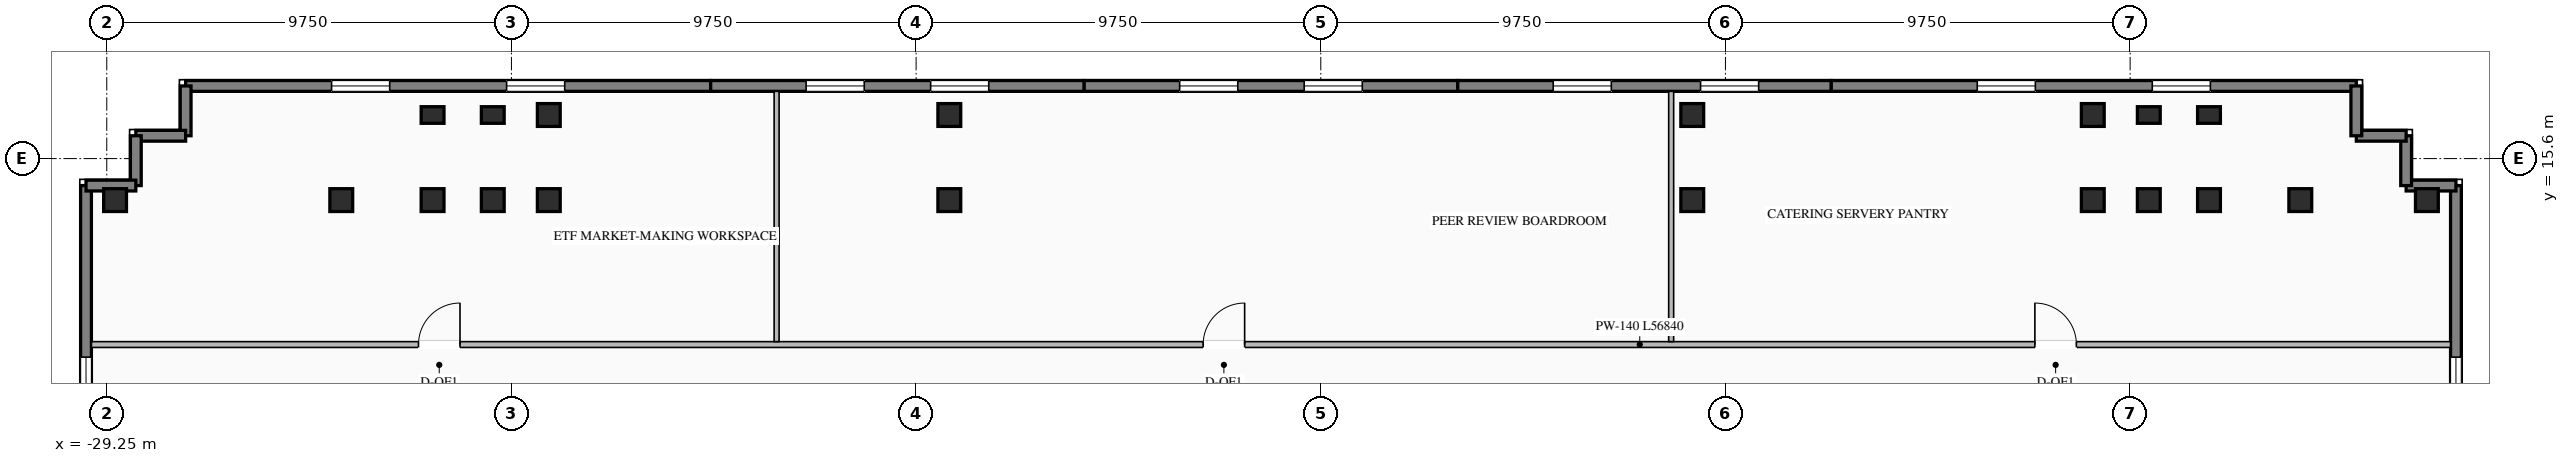
"""IFC4 building model, lengths in metres.
Left out: names, types, materials, properties, quantities, classifications, styles, units other than length and angle.
Written with IfcOpenShell. Run it as: python <this file> out.ifc"""

import sys

from ifc_helpers import new_model, si_unit, direction, frame, frame_2d, origin, origin_2d, place, context, subcontext, project, spatial, rectangle, i_section, extrude, element, fill, save


model = new_model("IFC4")
c1 = context("Model", 3, precision=1e-05, world=origin(), true_north=direction((0.0, 1.0)))
c2 = subcontext(c1, "Body", "Model", "MODEL_VIEW")
j1 = project(units=[si_unit("LENGTHUNIT", "METRE"), si_unit("PLANEANGLEUNIT", "RADIAN")], contexts=[c1])
p1 = place(None, origin())
s1 = spatial("IfcSite", under=j1, at=p1, CompositionType="ELEMENT")
p2 = place(p1, origin())
s2 = spatial("IfcBuilding", under=s1, at=p2, CompositionType="ELEMENT")
p3 = place(p2, frame((0.0, 0.0, 208.5)))
s3 = spatial("IfcBuildingStorey", under=s2, at=p3, CompositionType="ELEMENT", Elevation=208.5)
for number, where, z_axis, x_axis in (
    (1, (-21.4, 14.6, 0.0), (0.0, 0.0, 1.0), (1.0, 0.0, 0.0)),
    (2, (-19.95, 14.6, 0.0), (0.0, 0.0, 1.0), (1.0, 0.0, 0.0)),
    (3, (-18.6, 14.6, 0.0), (0.0, 0.0, 1.0), (1.0, 0.0, 0.0)),
    (4, (-8.95, 14.6, 0.0), (0.0, 0.0, 1.0), (1.0, 0.0, 0.0)),
    (5, (8.95, 14.6, 0.0), (0.0, 0.0, 1.0), (1.0, 0.0, 0.0)),
    (6, (18.6, 14.6, 0.0), (0.0, 0.0, 1.0), (1.0, 0.0, 0.0)),
    (7, (19.95, 14.6, 0.0), (0.0, 0.0, 1.0), (1.0, 0.0, 0.0)),
    (8, (21.4, 14.6, 0.0), (0.0, 0.0, 1.0), (1.0, 0.0, 0.0)),
    (9, (-23.6, 14.6, 0.0), (0.0, 0.0, 1.0), (1.0, 0.0, 0.0)),
    (10, (23.6, 14.6, 0.0), (0.0, 0.0, 1.0), (1.0, 0.0, 0.0)),
    (11, (-18.6, 16.65, 0.0), (0.0, 0.0, 1.0), (1.0, 0.0, 0.0)),
    (12, (-8.95, 16.65, 0.0), (0.0, 0.0, 1.0), (1.0, 0.0, 0.0)),
    (13, (8.95, 16.65, 0.0), (0.0, 0.0, 1.0), (1.0, 0.0, 0.0)),
    (14, (18.6, 16.65, 0.0), (0.0, 0.0, 1.0), (1.0, 0.0, 0.0)),
    (15, (-29.05, 14.6, 0.0), (0.0, 0.0, 1.0), (1.0, 0.0, 0.0)),
    (16, (26.65, 14.6, 0.0), (0.0, 0.0, 1.0), (1.0, 0.0, 0.0)),
):
    element("IfcColumn", number, at=place(p3, frame(where, z_axis=z_axis, x_axis=x_axis)), inside=s3, PredefinedType="COLUMN", context=c2, shape_type="SweptSolid", body=[
        extrude(i_section(OverallWidth=0.55, OverallDepth=0.55, WebThickness=0.024, FlangeThickness=0.036, at=origin_2d()), origin(), (0.0, 0.0, 1.0), 3.45),
    ])
for number, where, z_axis, x_axis in (
    (17, (-21.4, 16.65, 0.0), (0.0, 0.0, 1.0), (1.0, 0.0, 0.0)),
    (18, (-19.95, 16.65, 0.0), (0.0, 0.0, 1.0), (1.0, 0.0, 0.0)),
    (19, (19.95, 16.65, 0.0), (0.0, 0.0, 1.0), (1.0, 0.0, 0.0)),
    (20, (21.4, 16.65, 0.0), (0.0, 0.0, 1.0), (1.0, 0.0, 0.0)),
):
    element("IfcColumn", number, at=place(p3, frame(where, z_axis=z_axis, x_axis=x_axis)), inside=s3, PredefinedType="PILASTER", context=c2, shape_type="SweptSolid", body=[
        extrude(rectangle(XDim=0.55, YDim=0.4, at=origin_2d()), origin(), (0.0, 0.0, 1.0), 3.45),
    ])
p4 = place(p3, frame((-27.35, 17.35, 0.0), z_axis=(0.0, 0.0, 1.0), x_axis=(1.0, 0.0, 0.0)))
e21 = element("IfcWall", 21, at=p4, inside=s3, PredefinedType="STANDARD", context=c2, shape_type="SweptSolid", body=[
    extrude(rectangle(XDim=12.65, YDim=0.26, at=frame_2d((6.325, 0.0))), origin(), (0.0, 0.0, 1.0), 3.25),
])
p5 = place(p4, frame((3.517, 0.0, 0.76)))
e22 = element("IfcOpeningElement", 22, at=p5, cuts=e21, PredefinedType="OPENING", context=c2, shape_type="SweptSolid", body=[
    extrude(rectangle(XDim=1.4, YDim=1.95, at=frame_2d((0.7, 0.975))), frame((0.0, 0.14, 0.0), z_axis=(0.0, -1.0, 0.0), x_axis=(1.0, 0.0, 0.0)), (0.0, 0.0, 1.0), 0.28),
])
p6 = place(p4, frame((7.733, 0.0, 0.76)))
e23 = element("IfcOpeningElement", 23, at=p6, cuts=e21, PredefinedType="OPENING", context=c2, shape_type="SweptSolid", body=[
    extrude(rectangle(XDim=1.4, YDim=1.95, at=frame_2d((0.7, 0.975))), frame((0.0, 0.14, 0.0), z_axis=(0.0, -1.0, 0.0), x_axis=(1.0, 0.0, 0.0)), (0.0, 0.0, 1.0), 0.28),
])
p7 = place(p3, frame((-14.7, 17.35, 0.0), z_axis=(0.0, 0.0, 1.0), x_axis=(1.0, 0.0, 0.0)))
e24 = element("IfcWall", 24, at=p7, inside=s3, PredefinedType="STANDARD", context=c2, shape_type="SweptSolid", body=[
    extrude(rectangle(XDim=9.0, YDim=0.26, at=frame_2d((4.5, 0.0))), origin(), (0.0, 0.0, 1.0), 3.25),
])
p8 = place(p7, frame((2.3, 0.0, 0.76)))
e25 = element("IfcOpeningElement", 25, at=p8, cuts=e24, PredefinedType="OPENING", context=c2, shape_type="SweptSolid", body=[
    extrude(rectangle(XDim=1.4, YDim=1.95, at=frame_2d((0.7, 0.975))), frame((0.0, 0.14, 0.0), z_axis=(0.0, -1.0, 0.0), x_axis=(1.0, 0.0, 0.0)), (0.0, 0.0, 1.0), 0.28),
])
p9 = place(p7, frame((5.3, 0.0, 0.76)))
e26 = element("IfcOpeningElement", 26, at=p9, cuts=e24, PredefinedType="OPENING", context=c2, shape_type="SweptSolid", body=[
    extrude(rectangle(XDim=1.4, YDim=1.95, at=frame_2d((0.7, 0.975))), frame((0.0, 0.14, 0.0), z_axis=(0.0, -1.0, 0.0), x_axis=(1.0, 0.0, 0.0)), (0.0, 0.0, 1.0), 0.28),
])
p10 = place(p3, frame((-5.7, 17.35, 0.0), z_axis=(0.0, 0.0, 1.0), x_axis=(1.0, 0.0, 0.0)))
e27 = element("IfcWall", 27, at=p10, inside=s3, PredefinedType="STANDARD", context=c2, shape_type="SweptSolid", body=[
    extrude(rectangle(XDim=9.0, YDim=0.26, at=frame_2d((4.5, 0.0))), origin(), (0.0, 0.0, 1.0), 3.25),
])
p11 = place(p10, frame((2.3, 0.0, 0.76)))
e28 = element("IfcOpeningElement", 28, at=p11, cuts=e27, PredefinedType="OPENING", context=c2, shape_type="SweptSolid", body=[
    extrude(rectangle(XDim=1.4, YDim=1.95, at=frame_2d((0.7, 0.975))), frame((0.0, 0.14, 0.0), z_axis=(0.0, -1.0, 0.0), x_axis=(1.0, 0.0, 0.0)), (0.0, 0.0, 1.0), 0.28),
])
p12 = place(p10, frame((5.3, 0.0, 0.76)))
e29 = element("IfcOpeningElement", 29, at=p12, cuts=e27, PredefinedType="OPENING", context=c2, shape_type="SweptSolid", body=[
    extrude(rectangle(XDim=1.4, YDim=1.95, at=frame_2d((0.7, 0.975))), frame((0.0, 0.14, 0.0), z_axis=(0.0, -1.0, 0.0), x_axis=(1.0, 0.0, 0.0)), (0.0, 0.0, 1.0), 0.28),
])
p13 = place(p3, frame((3.3, 17.35, 0.0), z_axis=(0.0, 0.0, 1.0), x_axis=(1.0, 0.0, 0.0)))
e30 = element("IfcWall", 30, at=p13, inside=s3, PredefinedType="STANDARD", context=c2, shape_type="SweptSolid", body=[
    extrude(rectangle(XDim=9.0, YDim=0.26, at=frame_2d((4.5, 0.0))), origin(), (0.0, 0.0, 1.0), 3.25),
])
p14 = place(p13, frame((2.3, 0.0, 0.76)))
e31 = element("IfcOpeningElement", 31, at=p14, cuts=e30, PredefinedType="OPENING", context=c2, shape_type="SweptSolid", body=[
    extrude(rectangle(XDim=1.4, YDim=1.95, at=frame_2d((0.7, 0.975))), frame((0.0, 0.14, 0.0), z_axis=(0.0, -1.0, 0.0), x_axis=(1.0, 0.0, 0.0)), (0.0, 0.0, 1.0), 0.28),
])
p15 = place(p13, frame((5.85, 0.0, 0.76)))
e32 = element("IfcOpeningElement", 32, at=p15, cuts=e30, PredefinedType="OPENING", context=c2, shape_type="SweptSolid", body=[
    extrude(rectangle(XDim=1.4, YDim=1.95, at=frame_2d((0.7, 0.975))), frame((0.0, 0.14, 0.0), z_axis=(0.0, -1.0, 0.0), x_axis=(1.0, 0.0, 0.0)), (0.0, 0.0, 1.0), 0.28),
])
p16 = place(p3, frame((12.3, 17.35, 0.0), z_axis=(0.0, 0.0, 1.0), x_axis=(1.0, 0.0, 0.0)))
e33 = element("IfcWall", 33, at=p16, inside=s3, PredefinedType="STANDARD", context=c2, shape_type="SweptSolid", body=[
    extrude(rectangle(XDim=12.65, YDim=0.26, at=frame_2d((6.325, 0.0))), origin(), (0.0, 0.0, 1.0), 3.25),
])
p17 = place(p16, frame((3.517, 0.0, 0.76)))
e34 = element("IfcOpeningElement", 34, at=p17, cuts=e33, PredefinedType="OPENING", context=c2, shape_type="SweptSolid", body=[
    extrude(rectangle(XDim=1.4, YDim=1.95, at=frame_2d((0.7, 0.975))), frame((0.0, 0.14, 0.0), z_axis=(0.0, -1.0, 0.0), x_axis=(1.0, 0.0, 0.0)), (0.0, 0.0, 1.0), 0.28),
])
p18 = place(p16, frame((7.733, 0.0, 0.76)))
e35 = element("IfcOpeningElement", 35, at=p18, cuts=e33, PredefinedType="OPENING", context=c2, shape_type="SweptSolid", body=[
    extrude(rectangle(XDim=1.4, YDim=1.95, at=frame_2d((0.7, 0.975))), frame((0.0, 0.14, 0.0), z_axis=(0.0, -1.0, 0.0), x_axis=(1.0, 0.0, 0.0)), (0.0, 0.0, 1.0), 0.28),
])
p19 = place(p3, frame((-29.75, -0.9, 0.0), z_axis=(0.0, 0.0, 1.0), x_axis=(0.0, 1.0, 0.0)))
e36 = element("IfcWall", 36, at=p19, inside=s3, PredefinedType="STANDARD", context=c2, shape_type="SweptSolid", body=[
    extrude(rectangle(XDim=15.85, YDim=0.26, at=frame_2d((7.925, 0.0))), origin(), (0.0, 0.0, 1.0), 3.25),
])
p20 = place(p19, frame((4.683, 0.0, 0.76)))
e37 = element("IfcOpeningElement", 37, at=p20, cuts=e36, PredefinedType="OPENING", context=c2, shape_type="SweptSolid", body=[
    extrude(rectangle(XDim=1.2, YDim=1.95, at=frame_2d((0.6, 0.975))), frame((0.0, 0.14, 0.0), z_axis=(0.0, -1.0, 0.0), x_axis=(1.0, 0.0, 0.0)), (0.0, 0.0, 1.0), 0.28),
])
p21 = place(p19, frame((10.517, 0.0, 0.76)))
e38 = element("IfcOpeningElement", 38, at=p21, cuts=e36, PredefinedType="OPENING", context=c2, shape_type="SweptSolid", body=[
    extrude(rectangle(XDim=1.2, YDim=1.95, at=frame_2d((0.6, 0.975))), frame((0.0, 0.14, 0.0), z_axis=(0.0, -1.0, 0.0), x_axis=(1.0, 0.0, 0.0)), (0.0, 0.0, 1.0), 0.28),
])
p22 = place(p3, frame((27.35, 14.95, 0.0), z_axis=(0.0, 0.0, 1.0), x_axis=(0.0, -1.0, 0.0)))
e39 = element("IfcWall", 39, at=p22, inside=s3, PredefinedType="STANDARD", context=c2, shape_type="SweptSolid", body=[
    extrude(rectangle(XDim=15.85, YDim=0.26, at=frame_2d((7.925, 0.0))), origin(), (0.0, 0.0, 1.0), 3.25),
])
p23 = place(p22, frame((4.133, 0.0, 0.76)))
e40 = element("IfcOpeningElement", 40, at=p23, cuts=e39, PredefinedType="OPENING", context=c2, shape_type="SweptSolid", body=[
    extrude(rectangle(XDim=1.2, YDim=1.95, at=frame_2d((0.6, 0.975))), frame((0.0, 0.14, 0.0), z_axis=(0.0, -1.0, 0.0), x_axis=(1.0, 0.0, 0.0)), (0.0, 0.0, 1.0), 0.28),
])
p24 = place(p22, frame((9.967, 0.0, 0.76)))
e41 = element("IfcOpeningElement", 41, at=p24, cuts=e39, PredefinedType="OPENING", context=c2, shape_type="SweptSolid", body=[
    extrude(rectangle(XDim=1.2, YDim=1.95, at=frame_2d((0.6, 0.975))), frame((0.0, 0.14, 0.0), z_axis=(0.0, -1.0, 0.0), x_axis=(1.0, 0.0, 0.0)), (0.0, 0.0, 1.0), 0.28),
])
p25 = place(p3, frame((27.35, 14.95, 0.0), z_axis=(0.0, 0.0, 1.0), x_axis=(-1.0, 0.0, 0.0)))
e42 = element("IfcWall", 42, at=p25, inside=s3, PredefinedType="STANDARD", context=c2, shape_type="SweptSolid", body=[
    extrude(rectangle(XDim=1.2, YDim=0.26, at=frame_2d((0.6, 0.0))), origin(), (0.0, 0.0, 1.0), 2.565),
])
for number, where, z_axis, x_axis in (
    (43, (26.15, 14.95, 0.0), (0.0, 0.0, 1.0), (0.0, 1.0, 0.0)),
    (44, (26.15, 16.15, 0.0), (0.0, 0.0, 1.0), (-1.0, 0.0, 0.0)),
):
    element("IfcWall", number, at=place(p3, frame(where, z_axis=z_axis, x_axis=x_axis)), inside=s3, PredefinedType="STANDARD", context=c2, shape_type="SweptSolid", body=[
        extrude(rectangle(XDim=1.2, YDim=0.26, at=frame_2d((0.6, 0.0))), origin(), (0.0, 0.0, 1.0), 2.565),
    ])
for number, where, z_axis, x_axis in (
    (45, (24.95, 16.15, 0.0), (0.0, 0.0, 1.0), (0.0, 1.0, 0.0)),
    (46, (-27.35, 17.35, 0.0), (0.0, 0.0, 1.0), (0.0, -1.0, 0.0)),
):
    element("IfcWall", number, at=place(p3, frame(where, z_axis=z_axis, x_axis=x_axis)), inside=s3, PredefinedType="STANDARD", context=c2, shape_type="SweptSolid", body=[
        extrude(rectangle(XDim=1.2, YDim=0.26, at=frame_2d((0.6, 0.0))), origin(), (0.0, 0.0, 1.0), 2.565),
    ])
for number, where, z_axis, x_axis in (
    (47, (-27.35, 16.15, 0.0), (0.0, 0.0, 1.0), (-1.0, 0.0, 0.0)),
    (48, (-28.55, 16.15, 0.0), (0.0, 0.0, 1.0), (0.0, -1.0, 0.0)),
    (49, (-28.55, 14.95, 0.0), (0.0, 0.0, 1.0), (-1.0, 0.0, 0.0)),
):
    element("IfcWall", number, at=place(p3, frame(where, z_axis=z_axis, x_axis=x_axis)), inside=s3, PredefinedType="STANDARD", context=c2, shape_type="SweptSolid", body=[
        extrude(rectangle(XDim=1.2, YDim=0.26, at=frame_2d((0.6, 0.0))), origin(), (0.0, 0.0, 1.0), 2.565),
    ])
p26 = place(p3, frame((-29.62, 11.12, 0.0), z_axis=(0.0, 0.0, 1.0), x_axis=(1.0, 0.0, 0.0)))
e50 = element("IfcWall", 50, at=p26, inside=s3, PredefinedType="STANDARD", context=c2, shape_type="SweptSolid", body=[
    extrude(rectangle(XDim=56.84, YDim=0.14, at=frame_2d((28.42, 0.0))), origin(), (0.0, 0.0, 1.0), 3.25),
])
p27 = place(p26, frame((7.881, 0.0, 0.0)))
e51 = element("IfcOpeningElement", 51, at=p27, cuts=e50, PredefinedType="OPENING", context=c2, shape_type="SweptSolid", body=[
    extrude(rectangle(XDim=1.0, YDim=2.08, at=frame_2d((0.5, 1.04))), frame((0.0, 0.08, 0.0), z_axis=(0.0, -1.0, 0.0), x_axis=(1.0, 0.0, 0.0)), (0.0, 0.0, 1.0), 0.16),
])
p28 = place(p26, frame((26.785, 0.0, 0.0)))
e52 = element("IfcOpeningElement", 52, at=p28, cuts=e50, PredefinedType="OPENING", context=c2, shape_type="SweptSolid", body=[
    extrude(rectangle(XDim=1.0, YDim=2.08, at=frame_2d((0.5, 1.04))), frame((0.0, 0.08, 0.0), z_axis=(0.0, -1.0, 0.0), x_axis=(1.0, 0.0, 0.0)), (0.0, 0.0, 1.0), 0.16),
])
p29 = place(p26, frame((46.825, 0.0, 0.0)))
e53 = element("IfcOpeningElement", 53, at=p29, cuts=e50, PredefinedType="OPENING", context=c2, shape_type="SweptSolid", body=[
    extrude(rectangle(XDim=1.0, YDim=2.08, at=frame_2d((0.5, 1.04))), frame((0.0, 0.08, 0.0), z_axis=(0.0, -1.0, 0.0), x_axis=(1.0, 0.0, 0.0)), (0.0, 0.0, 1.0), 0.16),
])
for number, where, z_axis, x_axis in (
    (54, (-13.111, 11.19, 0.0), (0.0, 0.0, 1.0), (0.0, 1.0, 0.0)),
    (55, (8.442, 11.19, 0.0), (0.0, 0.0, 1.0), (0.0, 1.0, 0.0)),
):
    element("IfcWall", number, at=place(p3, frame(where, z_axis=z_axis, x_axis=x_axis)), inside=s3, PredefinedType="STANDARD", context=c2, shape_type="SweptSolid", body=[
        extrude(rectangle(XDim=6.03, YDim=0.12, at=frame_2d((3.015, 0.0))), origin(), (0.0, 0.0, 1.0), 3.25),
    ])
p30 = place(p5, origin())
e56 = element("IfcWindow", 56, at=p30, inside=s3, PartitioningType="SINGLE_PANEL", PredefinedType="WINDOW", context=c2, shape_type="SweptSolid", body=[
    extrude(rectangle(XDim=1.4, YDim=1.95, at=frame_2d((0.7, 0.975))), frame((0.0, 0.03, 0.0), z_axis=(0.0, -1.0, 0.0), x_axis=(1.0, 0.0, 0.0)), (0.0, 0.0, 1.0), 0.06),
])
fill(e22, e56)
p31 = place(p6, origin())
e57 = element("IfcWindow", 57, at=p31, inside=s3, PartitioningType="SINGLE_PANEL", PredefinedType="WINDOW", context=c2, shape_type="SweptSolid", body=[
    extrude(rectangle(XDim=1.4, YDim=1.95, at=frame_2d((0.7, 0.975))), frame((0.0, 0.03, 0.0), z_axis=(0.0, -1.0, 0.0), x_axis=(1.0, 0.0, 0.0)), (0.0, 0.0, 1.0), 0.06),
])
fill(e23, e57)
p32 = place(p8, origin())
e58 = element("IfcWindow", 58, at=p32, inside=s3, PartitioningType="SINGLE_PANEL", PredefinedType="WINDOW", context=c2, shape_type="SweptSolid", body=[
    extrude(rectangle(XDim=1.4, YDim=1.95, at=frame_2d((0.7, 0.975))), frame((0.0, 0.03, 0.0), z_axis=(0.0, -1.0, 0.0), x_axis=(1.0, 0.0, 0.0)), (0.0, 0.0, 1.0), 0.06),
])
fill(e25, e58)
p33 = place(p9, origin())
e59 = element("IfcWindow", 59, at=p33, inside=s3, PartitioningType="SINGLE_PANEL", PredefinedType="WINDOW", context=c2, shape_type="SweptSolid", body=[
    extrude(rectangle(XDim=1.4, YDim=1.95, at=frame_2d((0.7, 0.975))), frame((0.0, 0.03, 0.0), z_axis=(0.0, -1.0, 0.0), x_axis=(1.0, 0.0, 0.0)), (0.0, 0.0, 1.0), 0.06),
])
fill(e26, e59)
p34 = place(p11, origin())
e60 = element("IfcWindow", 60, at=p34, inside=s3, PartitioningType="SINGLE_PANEL", PredefinedType="WINDOW", context=c2, shape_type="SweptSolid", body=[
    extrude(rectangle(XDim=1.4, YDim=1.95, at=frame_2d((0.7, 0.975))), frame((0.0, 0.03, 0.0), z_axis=(0.0, -1.0, 0.0), x_axis=(1.0, 0.0, 0.0)), (0.0, 0.0, 1.0), 0.06),
])
fill(e28, e60)
p35 = place(p12, origin())
e61 = element("IfcWindow", 61, at=p35, inside=s3, PartitioningType="SINGLE_PANEL", PredefinedType="WINDOW", context=c2, shape_type="SweptSolid", body=[
    extrude(rectangle(XDim=1.4, YDim=1.95, at=frame_2d((0.7, 0.975))), frame((0.0, 0.03, 0.0), z_axis=(0.0, -1.0, 0.0), x_axis=(1.0, 0.0, 0.0)), (0.0, 0.0, 1.0), 0.06),
])
fill(e29, e61)
p36 = place(p14, origin())
e62 = element("IfcWindow", 62, at=p36, inside=s3, PartitioningType="SINGLE_PANEL", PredefinedType="WINDOW", context=c2, shape_type="SweptSolid", body=[
    extrude(rectangle(XDim=1.4, YDim=1.95, at=frame_2d((0.7, 0.975))), frame((0.0, 0.03, 0.0), z_axis=(0.0, -1.0, 0.0), x_axis=(1.0, 0.0, 0.0)), (0.0, 0.0, 1.0), 0.06),
])
fill(e31, e62)
p37 = place(p15, origin())
e63 = element("IfcWindow", 63, at=p37, inside=s3, PartitioningType="SINGLE_PANEL", PredefinedType="WINDOW", context=c2, shape_type="SweptSolid", body=[
    extrude(rectangle(XDim=1.4, YDim=1.95, at=frame_2d((0.7, 0.975))), frame((0.0, 0.03, 0.0), z_axis=(0.0, -1.0, 0.0), x_axis=(1.0, 0.0, 0.0)), (0.0, 0.0, 1.0), 0.06),
])
fill(e32, e63)
p38 = place(p17, origin())
e64 = element("IfcWindow", 64, at=p38, inside=s3, PartitioningType="SINGLE_PANEL", PredefinedType="WINDOW", context=c2, shape_type="SweptSolid", body=[
    extrude(rectangle(XDim=1.4, YDim=1.95, at=frame_2d((0.7, 0.975))), frame((0.0, 0.03, 0.0), z_axis=(0.0, -1.0, 0.0), x_axis=(1.0, 0.0, 0.0)), (0.0, 0.0, 1.0), 0.06),
])
fill(e34, e64)
p39 = place(p18, origin())
e65 = element("IfcWindow", 65, at=p39, inside=s3, PartitioningType="SINGLE_PANEL", PredefinedType="WINDOW", context=c2, shape_type="SweptSolid", body=[
    extrude(rectangle(XDim=1.4, YDim=1.95, at=frame_2d((0.7, 0.975))), frame((0.0, 0.03, 0.0), z_axis=(0.0, -1.0, 0.0), x_axis=(1.0, 0.0, 0.0)), (0.0, 0.0, 1.0), 0.06),
])
fill(e35, e65)
p40 = place(p21, origin())
e66 = element("IfcWindow", 66, at=p40, inside=s3, PartitioningType="SINGLE_PANEL", PredefinedType="WINDOW", context=c2, shape_type="SweptSolid", body=[
    extrude(rectangle(XDim=1.2, YDim=1.95, at=frame_2d((0.6, 0.975))), frame((0.0, 0.03, 0.0), z_axis=(0.0, -1.0, 0.0), x_axis=(1.0, 0.0, 0.0)), (0.0, 0.0, 1.0), 0.06),
])
fill(e38, e66)
p41 = place(p23, origin())
e67 = element("IfcWindow", 67, at=p41, inside=s3, PartitioningType="SINGLE_PANEL", PredefinedType="WINDOW", context=c2, shape_type="SweptSolid", body=[
    extrude(rectangle(XDim=1.2, YDim=1.95, at=frame_2d((0.6, 0.975))), frame((0.0, 0.03, 0.0), z_axis=(0.0, -1.0, 0.0), x_axis=(1.0, 0.0, 0.0)), (0.0, 0.0, 1.0), 0.06),
])
fill(e40, e67)
p42 = place(p27, origin())
e68 = element("IfcDoor", 68, at=p42, inside=s3, OperationType="SINGLE_SWING_RIGHT", PredefinedType="DOOR", context=c2, shape_type="SweptSolid", body=[
    extrude(rectangle(XDim=1.0, YDim=2.08, at=frame_2d((0.5, 1.04))), frame((0.0, 0.025, 0.0), z_axis=(0.0, -1.0, 0.0), x_axis=(1.0, 0.0, 0.0)), (0.0, 0.0, 1.0), 0.05),
])
fill(e51, e68)
p43 = place(p28, origin())
e69 = element("IfcDoor", 69, at=p43, inside=s3, OperationType="SINGLE_SWING_RIGHT", PredefinedType="DOOR", context=c2, shape_type="SweptSolid", body=[
    extrude(rectangle(XDim=1.0, YDim=2.08, at=frame_2d((0.5, 1.04))), frame((0.0, 0.025, 0.0), z_axis=(0.0, -1.0, 0.0), x_axis=(1.0, 0.0, 0.0)), (0.0, 0.0, 1.0), 0.05),
])
fill(e52, e69)
p44 = place(p29, origin())
e70 = element("IfcDoor", 70, at=p44, inside=s3, OperationType="SINGLE_SWING_LEFT", PredefinedType="DOOR", context=c2, shape_type="SweptSolid", body=[
    extrude(rectangle(XDim=1.0, YDim=2.08, at=frame_2d((0.5, 1.04))), frame((0.0, 0.025, 0.0), z_axis=(0.0, -1.0, 0.0), x_axis=(1.0, 0.0, 0.0)), (0.0, 0.0, 1.0), 0.05),
])
fill(e53, e70)
save(model, sys.argv[1])
